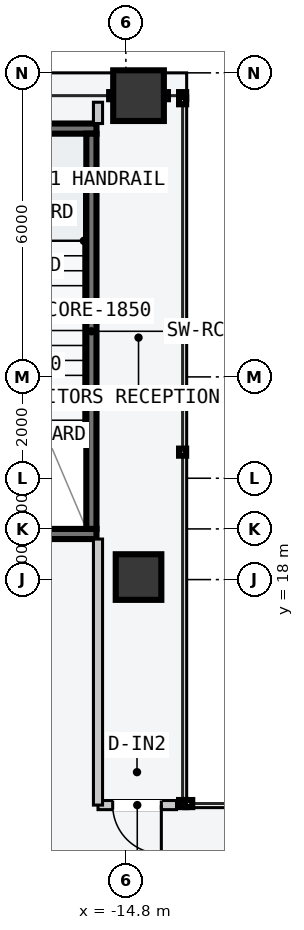
"""IFC4 building model, lengths in metres.
Left out: names, types, materials, properties, quantities, classifications, styles, units other than length and angle.
Written with IfcOpenShell. Run it as: python <this file> out.ifc"""

import sys

from ifc_helpers import new_model, si_unit, direction, frame, frame_2d, origin, origin_2d, place, context, subcontext, project, spatial, rectangle, hollow_rectangle, extrude, element, fill, save


model = new_model("IFC4")
c1 = context("Model", 3, precision=1e-05, world=origin(), true_north=direction((0.0, 1.0)))
c2 = subcontext(c1, "Body", "Model", "MODEL_VIEW")
j1 = project(units=[si_unit("LENGTHUNIT", "METRE"), si_unit("PLANEANGLEUNIT", "RADIAN")], contexts=[c1])
p1 = place(None, origin())
s1 = spatial("IfcSite", under=j1, at=p1, CompositionType="ELEMENT")
p2 = place(p1, origin())
s2 = spatial("IfcBuilding", under=s1, at=p2, CompositionType="ELEMENT")
p3 = place(p2, frame((0.0, 0.0, 4.8)))
s3 = spatial("IfcBuildingStorey", under=s2, at=p3, CompositionType="ELEMENT", Elevation=4.8)
p4 = place(p3, frame((-19.1, 18.9, -0.22), z_axis=(0.0, 0.0, 1.0), x_axis=(1.0, 0.0, 0.0)))
e1 = element("IfcWall", 1, at=p4, inside=s3, PredefinedType="SOLIDWALL", context=c2, shape_type="SweptSolid", body=[
    extrude(rectangle(XDim=3.72, YDim=0.2, at=frame_2d((1.86, 0.0))), origin(), (0.0, 0.0, 1.0), 4.8),
])
p5 = place(p4, frame((1.3, 0.0, 0.22)))
e2 = element("IfcOpeningElement", 2, at=p5, cuts=e1, PredefinedType="OPENING", context=c2, shape_type="SweptSolid", body=[
    extrude(rectangle(XDim=1.12, YDim=2.18, at=frame_2d((0.56, 1.09))), frame((0.0, 0.11, 0.0), z_axis=(0.0, -1.0, 0.0), x_axis=(1.0, 0.0, 0.0)), (0.0, 0.0, 1.0), 0.22),
])
p6 = place(p3, frame((-19.1, 26.9, -0.22), z_axis=(0.0, 0.0, 1.0), x_axis=(1.0, 0.0, 0.0)))
e3 = element("IfcWall", 3, at=p6, inside=s3, PredefinedType="SOLIDWALL", context=c2, shape_type="SweptSolid", body=[
    extrude(rectangle(XDim=3.72, YDim=0.2, at=frame_2d((1.86, 0.0))), origin(), (0.0, 0.0, 1.0), 4.8),
])
p7 = place(p3, frame((-15.48, 19.0, -0.22), z_axis=(0.0, 0.0, 1.0), x_axis=(0.0, 1.0, 0.0)))
e4 = element("IfcWall", 4, at=p7, inside=s3, PredefinedType="SOLIDWALL", context=c2, shape_type="SweptSolid", body=[
    extrude(rectangle(XDim=7.8, YDim=0.2, at=frame_2d((3.9, 0.0))), origin(), (0.0, 0.0, 1.0), 4.8),
])
p8 = place(p3, frame((-14.55, 18.05, 0.0), z_axis=(0.0, 0.0, 1.0), x_axis=(1.0, 0.0, 0.0)))
e5 = element("IfcColumn", 5, at=p8, inside=s3, PredefinedType="COLUMN", context=c2, shape_type="SweptSolid", body=[
    extrude(hollow_rectangle(XDim=0.9, YDim=0.9, WallThickness=0.045, at=origin_2d()), origin(), (0.0, 0.0, 1.0), 4.8),
])
p9 = place(p3, frame((-14.55, 27.55, 0.0), z_axis=(0.0, 0.0, 1.0), x_axis=(1.0, 0.0, 0.0)))
e6 = element("IfcColumn", 6, at=p9, inside=s3, PredefinedType="COLUMN", context=c2, shape_type="SweptSolid", body=[
    extrude(hollow_rectangle(XDim=1.0, YDim=1.0, WallThickness=0.05, at=origin_2d()), origin(), (0.0, 0.0, 1.0), 4.8),
])
p10 = place(p3, frame((-13.8, 13.55, 0.0), z_axis=(0.0, 0.0, 1.0), x_axis=(-1.0, 0.0, 0.0)))
e7 = element("IfcWall", 7, at=p10, inside=s3, PredefinedType="PARTITIONING", context=c2, shape_type="SweptSolid", body=[
    extrude(rectangle(XDim=1.55, YDim=0.18, at=frame_2d((0.775, 0.0))), origin(), (0.0, 0.0, 1.0), 4.58),
])
p11 = place(p10, frame((0.3, 0.0, 0.0)))
e8 = element("IfcOpeningElement", 8, at=p11, cuts=e7, PredefinedType="OPENING", context=c2, shape_type="SweptSolid", body=[
    extrude(rectangle(XDim=0.96, YDim=2.18, at=frame_2d((0.48, 1.09))), frame((0.0, 0.1, 0.0), z_axis=(0.0, -1.0, 0.0), x_axis=(1.0, 0.0, 0.0)), (0.0, 0.0, 1.0), 0.2),
])
p12 = place(p3, frame((-15.35, 13.55, 0.0), z_axis=(0.0, 0.0, 1.0), x_axis=(0.0, 1.0, 0.0)))
e9 = element("IfcWall", 9, at=p12, inside=s3, PredefinedType="PARTITIONING", context=c2, shape_type="SweptSolid", body=[
    extrude(rectangle(XDim=5.25, YDim=0.18, at=frame_2d((2.625, 0.0))), origin(), (0.0, 0.0, 1.0), 4.58),
])
p13 = place(p3, frame((-15.35, 27.0, 0.0), z_axis=(0.0, 0.0, 1.0), x_axis=(0.0, 1.0, 0.0)))
e10 = element("IfcWall", 10, at=p13, inside=s3, PredefinedType="PARTITIONING", context=c2, shape_type="SweptSolid", body=[
    extrude(rectangle(XDim=0.42, YDim=0.18, at=frame_2d((0.21, 0.0))), origin(), (0.0, 0.0, 1.0), 4.58),
])
p14 = place(p11, origin())
e11 = element("IfcDoor", 11, at=p14, inside=s3, OperationType="SINGLE_SWING_LEFT", PredefinedType="DOOR", context=c2, shape_type="SweptSolid", body=[
    extrude(rectangle(XDim=0.96, YDim=2.18, at=frame_2d((0.48, 1.09))), frame((0.0, 0.025, 0.0), z_axis=(0.0, -1.0, 0.0), x_axis=(1.0, 0.0, 0.0)), (0.0, 0.0, 1.0), 0.05),
])
fill(e8, e11)
save(model, sys.argv[1])
